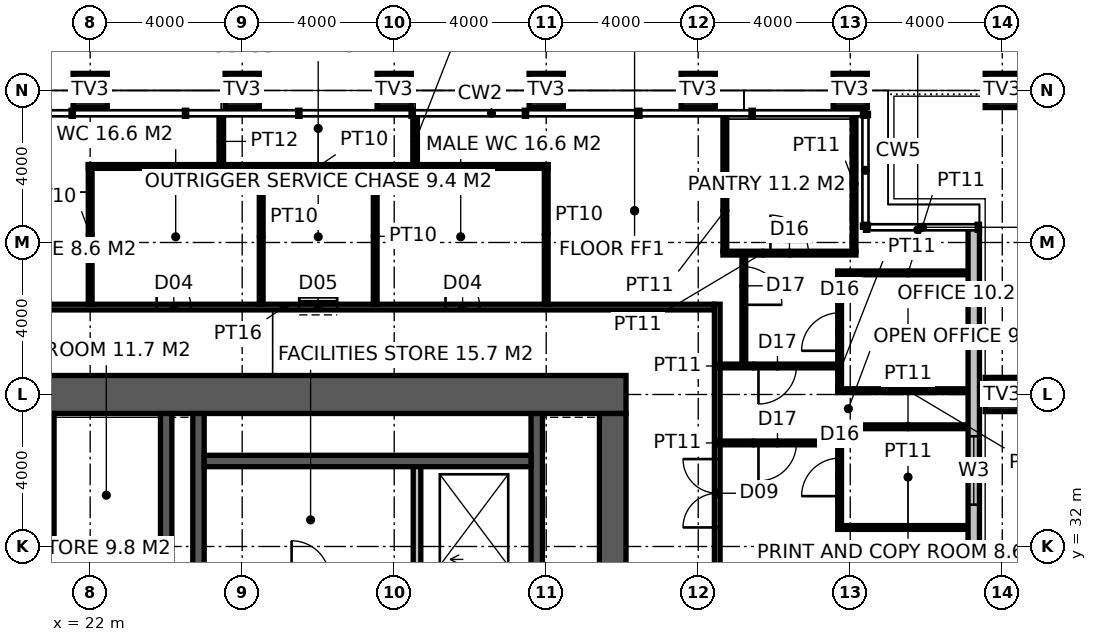
"""IFC4 building model, lengths in metres.
Left out: names, types, materials, properties, quantities, classifications, styles, units other than length and angle.
Written with IfcOpenShell. Run it as: python <this file> out.ifc"""

import sys

from ifc_helpers import new_model, si_unit, direction, frame, frame_2d, origin, origin_2d, place, context, subcontext, project, spatial, rectangle, hollow_rectangle, extrude, element, fill, save


model = new_model("IFC4")
c1 = context("Model", 3, precision=1e-05, world=origin(), true_north=direction((0.0, 1.0)))
c2 = subcontext(c1, "Body", "Model", "MODEL_VIEW")
j1 = project(units=[si_unit("LENGTHUNIT", "METRE"), si_unit("PLANEANGLEUNIT", "RADIAN")], contexts=[c1])
p1 = place(None, origin())
s1 = spatial("IfcSite", under=j1, at=p1, CompositionType="ELEMENT")
p2 = place(p1, origin())
s2 = spatial("IfcBuilding", under=s1, at=p2, CompositionType="ELEMENT")
p3 = place(p2, frame((0.0, 0.0, 270.2)))
s3 = spatial("IfcBuildingStorey", under=s2, at=p3, CompositionType="ELEMENT", Elevation=270.2)
for number, where, z_axis, x_axis in (
    (1, (22.0, 44.0, 0.0), (0.0, 0.0, 1.0), (1.0, 0.0, 0.0)),
    (2, (26.0, 44.0, 0.0), (0.0, 0.0, 1.0), (1.0, 0.0, 0.0)),
    (3, (30.0, 44.0, 0.0), (0.0, 0.0, 1.0), (1.0, 0.0, 0.0)),
    (4, (34.0, 44.0, 0.0), (0.0, 0.0, 1.0), (1.0, 0.0, 0.0)),
    (5, (38.0, 44.0, 0.0), (0.0, 0.0, 1.0), (1.0, 0.0, 0.0)),
    (6, (42.0, 44.0, 0.0), (0.0, 0.0, 1.0), (1.0, 0.0, 0.0)),
    (7, (46.0, 36.0, 0.0), (0.0, 0.0, 1.0), (1.0, 0.0, 0.0)),
    (8, (46.0, 44.0, 0.0), (0.0, 0.0, 1.0), (1.0, 0.0, 0.0)),
):
    element("IfcColumn", number, at=place(p3, frame(where, z_axis=z_axis, x_axis=x_axis)), inside=s3, PredefinedType="USERDEFINED", context=c2, shape_type="SweptSolid", body=[
        extrude(hollow_rectangle(XDim=0.9, YDim=0.9, WallThickness=0.08, at=origin_2d()), origin(), (0.0, 0.0, 1.0), 4.0),
    ])
p4 = place(p3, frame((18.5, 36.0, -0.15), z_axis=(0.0, 0.0, 1.0), x_axis=(1.0, 0.0, 0.0)))
e9 = element("IfcWall", 9, at=p4, inside=s3, PredefinedType="SHEAR", context=c2, shape_type="SweptSolid", body=[
    extrude(rectangle(XDim=17.6, YDim=1.0, at=frame_2d((8.8, 0.0))), origin(), (0.0, 0.0, 1.0), 4.0),
])
p5 = place(p3, frame((35.75, 18.5, -0.15), z_axis=(0.0, 0.0, 1.0), x_axis=(0.0, 1.0, 0.0)))
e10 = element("IfcWall", 10, at=p5, inside=s3, PredefinedType="SHEAR", context=c2, shape_type="SweptSolid", body=[
    extrude(rectangle(XDim=17.0, YDim=0.7, at=frame_2d((8.5, 0.0))), origin(), (0.0, 0.0, 1.0), 4.0),
])
p6 = place(p5, frame((9.85, 0.0, 0.15)))
e11 = element("IfcOpeningElement", 11, at=p6, cuts=e10, PredefinedType="OPENING", context=c2, shape_type="SweptSolid", body=[
    extrude(rectangle(XDim=1.0, YDim=2.2, at=frame_2d((0.5, 1.1))), frame((0.0, 0.36, 0.0), z_axis=(0.0, -1.0, 0.0), x_axis=(1.0, 0.0, 0.0)), (0.0, 0.0, 1.0), 0.72),
])
p7 = place(p3, frame((24.0, 18.5, -0.15), z_axis=(0.0, 0.0, 1.0), x_axis=(0.0, 1.0, 0.0)))
e12 = element("IfcWall", 12, at=p7, inside=s3, PredefinedType="SHEAR", context=c2, shape_type="SweptSolid", body=[
    extrude(rectangle(XDim=17.0, YDim=0.3, at=frame_2d((8.5, 0.0))), origin(), (0.0, 0.0, 1.0), 4.0),
])
p8 = place(p7, frame((9.6, 0.0, 0.15)))
e13 = element("IfcOpeningElement", 13, at=p8, cuts=e12, PredefinedType="OPENING", context=c2, shape_type="SweptSolid", body=[
    extrude(rectangle(XDim=1.5, YDim=2.4, at=frame_2d((0.75, 1.2))), frame((0.0, 0.16, 0.0), z_axis=(0.0, -1.0, 0.0), x_axis=(1.0, 0.0, 0.0)), (0.0, 0.0, 1.0), 0.32),
])
for number, where, z_axis, x_axis in (
    (14, (24.85, 31.3, -0.15), (0.0, 0.0, 1.0), (0.0, 1.0, 0.0)),
    (15, (33.75, 31.3, -0.15), (0.0, 0.0, 1.0), (0.0, 1.0, 0.0)),
):
    element("IfcWall", number, at=place(p3, frame(where, z_axis=z_axis, x_axis=x_axis)), inside=s3, PredefinedType="SHEAR", context=c2, shape_type="SweptSolid", body=[
        extrude(rectangle(XDim=4.2, YDim=0.3, at=frame_2d((2.1, 0.0))), origin(), (0.0, 0.0, 1.0), 4.0),
    ])
p9 = place(p3, frame((25.0, 34.25, -0.15), z_axis=(0.0, 0.0, 1.0), x_axis=(1.0, 0.0, 0.0)))
e16 = element("IfcWall", 16, at=p9, inside=s3, PredefinedType="SHEAR", context=c2, shape_type="SweptSolid", body=[
    extrude(rectangle(XDim=8.6, YDim=0.3, at=frame_2d((4.3, 0.0))), origin(), (0.0, 0.0, 1.0), 4.0),
])
p10 = place(p3, frame((30.6, 31.3, -0.15), z_axis=(0.0, 0.0, 1.0), x_axis=(0.0, 1.0, 0.0)))
e17 = element("IfcWall", 17, at=p10, inside=s3, PredefinedType="SOLIDWALL", context=c2, shape_type="SweptSolid", body=[
    extrude(rectangle(XDim=2.8, YDim=0.2, at=frame_2d((1.4, 0.0))), origin(), (0.0, 0.0, 1.0), 4.0),
])
p11 = place(p3, frame((21.0, 31.3, 0.0), z_axis=(0.0, 0.0, 1.0), x_axis=(0.0, 1.0, 0.0)))
e18 = element("IfcWall", 18, at=p11, inside=s3, PredefinedType="PARTITIONING", context=c2, shape_type="SweptSolid", body=[
    extrude(rectangle(XDim=4.2, YDim=0.1, at=frame_2d((2.1, 0.0))), origin(), (0.0, 0.0, 1.0), 3.85),
])
p12 = place(p11, frame((1.55, 0.0, 0.0)))
e19 = element("IfcOpeningElement", 19, at=p12, cuts=e18, PredefinedType="OPENING", context=c2, shape_type="SweptSolid", body=[
    extrude(rectangle(XDim=1.0, YDim=2.2, at=frame_2d((0.5, 1.1))), frame((0.0, 0.06, 0.0), z_axis=(0.0, -1.0, 0.0), x_axis=(1.0, 0.0, 0.0)), (0.0, 0.0, 1.0), 0.12),
])
p13 = place(p3, frame((38.5, 15.025, 0.0), z_axis=(0.0, 0.0, 1.0), x_axis=(0.0, 1.0, 0.0)))
e20 = element("IfcWall", 20, at=p13, inside=s3, PredefinedType="PARTITIONING", context=c2, shape_type="SweptSolid", body=[
    extrude(rectangle(XDim=23.35, YDim=0.15, at=frame_2d((11.675, 0.0))), origin(), (0.0, 0.0, 1.0), 2.85),
])
p14 = place(p13, frame((3.374, 0.0, 0.0)))
e21 = element("IfcOpeningElement", 21, at=p14, cuts=e20, PredefinedType="OPENING", context=c2, shape_type="SweptSolid", body=[
    extrude(rectangle(XDim=1.8, YDim=2.4, at=frame_2d((0.9, 1.2))), frame((0.0, 0.085, 0.0), z_axis=(0.0, -1.0, 0.0), x_axis=(1.0, 0.0, 0.0)), (0.0, 0.0, 1.0), 0.17),
])
p15 = place(p13, frame((17.476, 0.0, 0.0)))
e22 = element("IfcOpeningElement", 22, at=p15, cuts=e20, PredefinedType="OPENING", context=c2, shape_type="SweptSolid", body=[
    extrude(rectangle(XDim=1.8, YDim=2.4, at=frame_2d((0.9, 1.2))), frame((0.0, 0.085, 0.0), z_axis=(0.0, -1.0, 0.0), x_axis=(1.0, 0.0, 0.0)), (0.0, 0.0, 1.0), 0.17),
])
p16 = place(p13, frame((10.475, 0.0, 0.0)))
e23 = element("IfcOpeningElement", 23, at=p16, cuts=e20, PredefinedType="OPENING", context=c2, shape_type="SweptSolid", body=[
    extrude(rectangle(XDim=1.0, YDim=2.2, at=frame_2d((0.5, 1.1))), frame((0.0, 0.085, 0.0), z_axis=(0.0, -1.0, 0.0), x_axis=(1.0, 0.0, 0.0)), (0.0, 0.0, 1.0), 0.17),
])
p17 = place(p3, frame((15.775, 38.3, 0.0), z_axis=(0.0, 0.0, 1.0), x_axis=(1.0, 0.0, 0.0)))
e24 = element("IfcWall", 24, at=p17, inside=s3, PredefinedType="PARTITIONING", context=c2, shape_type="SweptSolid", body=[
    extrude(rectangle(XDim=22.65, YDim=0.15, at=frame_2d((11.325, 0.0))), origin(), (0.0, 0.0, 1.0), 3.85),
])
p18 = place(p17, frame((7.975, 0.0, 0.0)))
e25 = element("IfcOpeningElement", 25, at=p18, cuts=e24, PredefinedType="OPENING", context=c2, shape_type="SweptSolid", body=[
    extrude(rectangle(XDim=0.9, YDim=2.1, at=frame_2d((0.45, 1.05))), frame((0.0, 0.085, 0.0), z_axis=(0.0, -1.0, 0.0), x_axis=(1.0, 0.0, 0.0)), (0.0, 0.0, 1.0), 0.17),
])
p19 = place(p17, frame((11.725, 0.0, 0.0)))
e26 = element("IfcOpeningElement", 26, at=p19, cuts=e24, PredefinedType="OPENING", context=c2, shape_type="SweptSolid", body=[
    extrude(rectangle(XDim=1.0, YDim=2.1, at=frame_2d((0.5, 1.05))), frame((0.0, 0.085, 0.0), z_axis=(0.0, -1.0, 0.0), x_axis=(1.0, 0.0, 0.0)), (0.0, 0.0, 1.0), 0.17),
])
p20 = place(p17, frame((15.575, 0.0, 0.0)))
e27 = element("IfcOpeningElement", 27, at=p20, cuts=e24, PredefinedType="OPENING", context=c2, shape_type="SweptSolid", body=[
    extrude(rectangle(XDim=0.9, YDim=2.1, at=frame_2d((0.45, 1.05))), frame((0.0, 0.085, 0.0), z_axis=(0.0, -1.0, 0.0), x_axis=(1.0, 0.0, 0.0)), (0.0, 0.0, 1.0), 0.17),
])
for number, where, z_axis, x_axis in (
    (28, (22.0, 38.375, 0.0), (0.0, 0.0, 1.0), (0.0, 1.0, 0.0)),
    (29, (34.0, 38.375, 0.0), (0.0, 0.0, 1.0), (0.0, 1.0, 0.0)),
):
    element("IfcWall", number, at=place(p3, frame(where, z_axis=z_axis, x_axis=x_axis)), inside=s3, PredefinedType="PARTITIONING", context=c2, shape_type="SweptSolid", body=[
        extrude(rectangle(XDim=3.675, YDim=0.1, at=frame_2d((1.837, 0.0))), origin(), (0.0, 0.0, 1.0), 2.85),
    ])
p21 = place(p3, frame((21.95, 42.0, 0.0), z_axis=(0.0, 0.0, 1.0), x_axis=(1.0, 0.0, 0.0)))
e30 = element("IfcWall", 30, at=p21, inside=s3, PredefinedType="PARTITIONING", context=c2, shape_type="SweptSolid", body=[
    extrude(rectangle(XDim=12.1, YDim=0.1, at=frame_2d((6.05, 0.0))), origin(), (0.0, 0.0, 1.0), 3.85),
])
for number, where, z_axis, x_axis in (
    (31, (26.5, 38.375, 0.0), (0.0, 0.0, 1.0), (0.0, 1.0, 0.0)),
    (32, (29.5, 38.375, 0.0), (0.0, 0.0, 1.0), (0.0, 1.0, 0.0)),
):
    element("IfcWall", number, at=place(p3, frame(where, z_axis=z_axis, x_axis=x_axis)), inside=s3, PredefinedType="PARTITIONING", context=c2, shape_type="SweptSolid", body=[
        extrude(rectangle(XDim=3.575, YDim=0.1, at=frame_2d((1.788, 0.0))), origin(), (0.0, 0.0, 1.0), 2.65),
    ])
for number, where, z_axis, x_axis in (
    (33, (25.45, 42.0, 0.0), (0.0, 0.0, 1.0), (0.0, 1.0, 0.0)),
    (34, (30.55, 42.0, 0.0), (0.0, 0.0, 1.0), (0.0, 1.0, 0.0)),
):
    element("IfcWall", number, at=place(p3, frame(where, z_axis=z_axis, x_axis=x_axis)), inside=s3, PredefinedType="PARTITIONING", context=c2, shape_type="SweptSolid", body=[
        extrude(rectangle(XDim=1.32, YDim=0.12, at=frame_2d((0.66, 0.0))), origin(), (0.0, 0.0, 1.0), 2.65),
    ])
p22 = place(p3, frame((41.67, 32.5, 0.0), z_axis=(0.0, 0.0, 1.0), x_axis=(1.0, 0.0, 0.0)))
e35 = element("IfcWall", 35, at=p22, inside=s3, PredefinedType="PARTITIONING", context=c2, shape_type="SweptSolid", body=[
    extrude(rectangle(XDim=3.7, YDim=0.1, at=frame_2d((1.85, 0.0))), origin(), (0.0, 0.0, 1.0), 2.65),
])
p23 = place(p3, frame((41.67, 35.15, 0.0), z_axis=(0.0, 0.0, 1.0), x_axis=(1.0, 0.0, 0.0)))
e36 = element("IfcWall", 36, at=p23, inside=s3, PredefinedType="PARTITIONING", context=c2, shape_type="SweptSolid", body=[
    extrude(rectangle(XDim=3.7, YDim=0.1, at=frame_2d((1.85, 0.0))), origin(), (0.0, 0.0, 1.0), 3.85),
])
p24 = place(p3, frame((41.67, 36.1, 0.0), z_axis=(0.0, 0.0, 1.0), x_axis=(1.0, 0.0, 0.0)))
e37 = element("IfcWall", 37, at=p24, inside=s3, PredefinedType="PARTITIONING", context=c2, shape_type="SweptSolid", body=[
    extrude(rectangle(XDim=3.7, YDim=0.1, at=frame_2d((1.85, 0.0))), origin(), (0.0, 0.0, 1.0), 2.65),
])
p25 = place(p3, frame((41.67, 39.2, 0.0), z_axis=(0.0, 0.0, 1.0), x_axis=(1.0, 0.0, 0.0)))
e38 = element("IfcWall", 38, at=p25, inside=s3, PredefinedType="PARTITIONING", context=c2, shape_type="SweptSolid", body=[
    extrude(rectangle(XDim=3.7, YDim=0.1, at=frame_2d((1.85, 0.0))), origin(), (0.0, 0.0, 1.0), 3.85),
])
p26 = place(p3, frame((38.65, 39.72, 0.0), z_axis=(0.0, 0.0, 1.0), x_axis=(1.0, 0.0, 0.0)))
e39 = element("IfcWall", 39, at=p26, inside=s3, PredefinedType="PARTITIONING", context=c2, shape_type="SweptSolid", body=[
    extrude(rectangle(XDim=3.5, YDim=0.1, at=frame_2d((1.75, 0.0))), origin(), (0.0, 0.0, 1.0), 3.85),
])
p27 = place(p26, frame((1.25, 0.0, 0.0)))
e40 = element("IfcOpeningElement", 40, at=p27, cuts=e39, PredefinedType="OPENING", context=c2, shape_type="SweptSolid", body=[
    extrude(rectangle(XDim=1.0, YDim=2.2, at=frame_2d((0.5, 1.1))), frame((0.0, 0.06, 0.0), z_axis=(0.0, -1.0, 0.0), x_axis=(1.0, 0.0, 0.0)), (0.0, 0.0, 1.0), 0.12),
])
p28 = place(p3, frame((38.7, 39.77, 0.0), z_axis=(0.0, 0.0, 1.0), x_axis=(0.0, 1.0, 0.0)))
e41 = element("IfcWall", 41, at=p28, inside=s3, PredefinedType="PARTITIONING", context=c2, shape_type="SweptSolid", body=[
    extrude(rectangle(XDim=3.55, YDim=0.1, at=frame_2d((1.775, 0.0))), origin(), (0.0, 0.0, 1.0), 3.85),
])
p29 = place(p3, frame((41.72, 32.55, 0.0), z_axis=(0.0, 0.0, 1.0), x_axis=(0.0, 1.0, 0.0)))
e42 = element("IfcWall", 42, at=p29, inside=s3, PredefinedType="PARTITIONING", context=c2, shape_type="SweptSolid", body=[
    extrude(rectangle(XDim=2.55, YDim=0.1, at=frame_2d((1.275, 0.0))), origin(), (0.0, 0.0, 1.0), 3.85),
])
p30 = place(p29, frame((0.775, 0.0, 0.0)))
e43 = element("IfcOpeningElement", 43, at=p30, cuts=e42, PredefinedType="OPENING", context=c2, shape_type="SweptSolid", body=[
    extrude(rectangle(XDim=1.0, YDim=2.2, at=frame_2d((0.5, 1.1))), frame((0.0, 0.06, 0.0), z_axis=(0.0, -1.0, 0.0), x_axis=(1.0, 0.0, 0.0)), (0.0, 0.0, 1.0), 0.12),
])
p31 = place(p3, frame((41.72, 36.15, 0.0), z_axis=(0.0, 0.0, 1.0), x_axis=(0.0, 1.0, 0.0)))
e44 = element("IfcWall", 44, at=p31, inside=s3, PredefinedType="PARTITIONING", context=c2, shape_type="SweptSolid", body=[
    extrude(rectangle(XDim=3.0, YDim=0.1, at=frame_2d((1.5, 0.0))), origin(), (0.0, 0.0, 1.0), 2.85),
])
p32 = place(p31, frame((1.0, 0.0, 0.0)))
e45 = element("IfcOpeningElement", 45, at=p32, cuts=e44, PredefinedType="OPENING", context=c2, shape_type="SweptSolid", body=[
    extrude(rectangle(XDim=1.0, YDim=2.2, at=frame_2d((0.5, 1.1))), frame((0.0, 0.06, 0.0), z_axis=(0.0, -1.0, 0.0), x_axis=(1.0, 0.0, 0.0)), (0.0, 0.0, 1.0), 0.12),
])
p33 = place(p3, frame((42.1, 39.77, 0.0), z_axis=(0.0, 0.0, 1.0), x_axis=(0.0, 1.0, 0.0)))
e46 = element("IfcWall", 46, at=p33, inside=s3, PredefinedType="PARTITIONING", context=c2, shape_type="SweptSolid", body=[
    extrude(rectangle(XDim=3.55, YDim=0.1, at=frame_2d((1.775, 0.0))), origin(), (0.0, 0.0, 1.0), 2.85),
])
p34 = place(p3, frame((41.67, 34.725, 0.0), z_axis=(0.0, 0.0, 1.0), x_axis=(-1.0, 0.0, 0.0)))
e47 = element("IfcWall", 47, at=p34, inside=s3, PredefinedType="PARTITIONING", context=c2, shape_type="SweptSolid", body=[
    extrude(rectangle(XDim=3.17, YDim=0.1, at=frame_2d((1.585, 0.0))), origin(), (0.0, 0.0, 1.0), 3.85),
])
p35 = place(p34, frame((1.085, 0.0, 0.0)))
e48 = element("IfcOpeningElement", 48, at=p35, cuts=e47, PredefinedType="OPENING", context=c2, shape_type="SweptSolid", body=[
    extrude(rectangle(XDim=1.0, YDim=2.2, at=frame_2d((0.5, 1.1))), frame((0.0, 0.06, 0.0), z_axis=(0.0, -1.0, 0.0), x_axis=(1.0, 0.0, 0.0)), (0.0, 0.0, 1.0), 0.12),
])
p36 = place(p3, frame((41.67, 36.75, 0.0), z_axis=(0.0, 0.0, 1.0), x_axis=(-1.0, 0.0, 0.0)))
e49 = element("IfcWall", 49, at=p36, inside=s3, PredefinedType="PARTITIONING", context=c2, shape_type="SweptSolid", body=[
    extrude(rectangle(XDim=3.17, YDim=0.1, at=frame_2d((1.585, 0.0))), origin(), (0.0, 0.0, 1.0), 3.85),
])
p37 = place(p36, frame((1.085, 0.0, 0.0)))
e50 = element("IfcOpeningElement", 50, at=p37, cuts=e49, PredefinedType="OPENING", context=c2, shape_type="SweptSolid", body=[
    extrude(rectangle(XDim=1.0, YDim=2.2, at=frame_2d((0.5, 1.1))), frame((0.0, 0.06, 0.0), z_axis=(0.0, -1.0, 0.0), x_axis=(1.0, 0.0, 0.0)), (0.0, 0.0, 1.0), 0.12),
])
p38 = place(p3, frame((39.2, 39.67, 0.0), z_axis=(0.0, 0.0, 1.0), x_axis=(0.0, -1.0, 0.0)))
e51 = element("IfcWall", 51, at=p38, inside=s3, PredefinedType="PARTITIONING", context=c2, shape_type="SweptSolid", body=[
    extrude(rectangle(XDim=2.92, YDim=0.1, at=frame_2d((1.46, 0.0))), origin(), (0.0, 0.0, 1.0), 3.85),
])
p39 = place(p38, frame((0.31, 0.0, 0.0)))
e52 = element("IfcOpeningElement", 52, at=p39, cuts=e51, PredefinedType="OPENING", context=c2, shape_type="SweptSolid", body=[
    extrude(rectangle(XDim=1.0, YDim=2.2, at=frame_2d((0.5, 1.1))), frame((0.0, 0.06, 0.0), z_axis=(0.0, -1.0, 0.0), x_axis=(1.0, 0.0, 0.0)), (0.0, 0.0, 1.0), 0.12),
])
p40 = place(p3, frame((45.25, 7.6, 0.0), z_axis=(0.0, 0.0, 1.0), x_axis=(0.0, 1.0, 0.0)))
e53 = element("IfcWall", 53, at=p40, inside=s3, PredefinedType="ELEMENTEDWALL", context=c2, shape_type="SweptSolid", body=[
    extrude(rectangle(XDim=32.8, YDim=0.3, at=frame_2d((16.4, 0.0))), origin(), (0.0, 0.0, 1.0), 3.85),
])
p41 = place(p40, frame((5.5, 0.0, 0.8)))
e54 = element("IfcOpeningElement", 54, at=p41, cuts=e53, PredefinedType="OPENING", context=c2, shape_type="SweptSolid", body=[
    extrude(rectangle(XDim=1.8, YDim=2.4, at=frame_2d((0.9, 1.2))), frame((0.0, 0.16, 0.0), z_axis=(0.0, -1.0, 0.0), x_axis=(1.0, 0.0, 0.0)), (0.0, 0.0, 1.0), 0.32),
])
p42 = place(p40, frame((9.5, 0.0, 0.0)))
e55 = element("IfcOpeningElement", 55, at=p42, cuts=e53, PredefinedType="OPENING", context=c2, shape_type="SweptSolid", body=[
    extrude(rectangle(XDim=1.8, YDim=2.4, at=frame_2d((0.9, 1.2))), frame((0.0, 0.16, 0.0), z_axis=(0.0, -1.0, 0.0), x_axis=(1.0, 0.0, 0.0)), (0.0, 0.0, 1.0), 0.32),
])
p43 = place(p40, frame((13.5, 0.0, 0.8)))
e56 = element("IfcOpeningElement", 56, at=p43, cuts=e53, PredefinedType="OPENING", context=c2, shape_type="SweptSolid", body=[
    extrude(rectangle(XDim=1.8, YDim=2.4, at=frame_2d((0.9, 1.2))), frame((0.0, 0.16, 0.0), z_axis=(0.0, -1.0, 0.0), x_axis=(1.0, 0.0, 0.0)), (0.0, 0.0, 1.0), 0.32),
])
p44 = place(p40, frame((17.5, 0.0, 0.8)))
e57 = element("IfcOpeningElement", 57, at=p44, cuts=e53, PredefinedType="OPENING", context=c2, shape_type="SweptSolid", body=[
    extrude(rectangle(XDim=1.8, YDim=2.4, at=frame_2d((0.9, 1.2))), frame((0.0, 0.16, 0.0), z_axis=(0.0, -1.0, 0.0), x_axis=(1.0, 0.0, 0.0)), (0.0, 0.0, 1.0), 0.32),
])
p45 = place(p40, frame((21.5, 0.0, 0.8)))
e58 = element("IfcOpeningElement", 58, at=p45, cuts=e53, PredefinedType="OPENING", context=c2, shape_type="SweptSolid", body=[
    extrude(rectangle(XDim=1.8, YDim=2.4, at=frame_2d((0.9, 1.2))), frame((0.0, 0.16, 0.0), z_axis=(0.0, -1.0, 0.0), x_axis=(1.0, 0.0, 0.0)), (0.0, 0.0, 1.0), 0.32),
])
p46 = place(p40, frame((25.5, 0.0, 0.8)))
e59 = element("IfcOpeningElement", 59, at=p46, cuts=e53, PredefinedType="OPENING", context=c2, shape_type="SweptSolid", body=[
    extrude(rectangle(XDim=1.8, YDim=2.4, at=frame_2d((0.9, 1.2))), frame((0.0, 0.16, 0.0), z_axis=(0.0, -1.0, 0.0), x_axis=(1.0, 0.0, 0.0)), (0.0, 0.0, 1.0), 0.32),
])
p47 = place(p12, origin())
e60 = element("IfcDoor", 60, at=p47, inside=s3, OperationType="SINGLE_SWING_LEFT", PredefinedType="DOOR", context=c2, shape_type="SweptSolid", body=[
    extrude(rectangle(XDim=1.0, YDim=2.2, at=frame_2d((0.5, 1.1))), frame((0.0, 0.025, 0.0), z_axis=(0.0, -1.0, 0.0), x_axis=(1.0, 0.0, 0.0)), (0.0, 0.0, 1.0), 0.05),
])
fill(e19, e60)
p48 = place(p18, origin())
e61 = element("IfcDoor", 61, at=p48, inside=s3, OperationType="SINGLE_SWING_LEFT", PredefinedType="DOOR", context=c2, shape_type="SweptSolid", body=[
    extrude(rectangle(XDim=0.9, YDim=2.1, at=frame_2d((0.45, 1.05))), frame((0.0, 0.025, 0.0), z_axis=(0.0, -1.0, 0.0), x_axis=(1.0, 0.0, 0.0)), (0.0, 0.0, 1.0), 0.05),
])
fill(e25, e61)
p49 = place(p19, origin())
e62 = element("IfcDoor", 62, at=p49, inside=s3, OperationType="SLIDING_TO_LEFT", PredefinedType="DOOR", context=c2, shape_type="SweptSolid", body=[
    extrude(rectangle(XDim=1.0, YDim=2.1, at=frame_2d((0.5, 1.05))), frame((0.0, 0.025, 0.0), z_axis=(0.0, -1.0, 0.0), x_axis=(1.0, 0.0, 0.0)), (0.0, 0.0, 1.0), 0.05),
])
fill(e26, e62)
p50 = place(p20, origin())
e63 = element("IfcDoor", 63, at=p50, inside=s3, OperationType="SINGLE_SWING_LEFT", PredefinedType="DOOR", context=c2, shape_type="SweptSolid", body=[
    extrude(rectangle(XDim=0.9, YDim=2.1, at=frame_2d((0.45, 1.05))), frame((0.0, 0.025, 0.0), z_axis=(0.0, -1.0, 0.0), x_axis=(1.0, 0.0, 0.0)), (0.0, 0.0, 1.0), 0.05),
])
fill(e27, e63)
p51 = place(p15, origin())
e64 = element("IfcDoor", 64, at=p51, inside=s3, OperationType="DOUBLE_DOOR_DOUBLE_SWING", PredefinedType="DOOR", context=c2, shape_type="SweptSolid", body=[
    extrude(rectangle(XDim=1.8, YDim=2.4, at=frame_2d((0.9, 1.2))), frame((0.0, 0.025, 0.0), z_axis=(0.0, -1.0, 0.0), x_axis=(1.0, 0.0, 0.0)), (0.0, 0.0, 1.0), 0.05),
])
fill(e22, e64)
p52 = place(p27, origin())
e65 = element("IfcDoor", 65, at=p52, inside=s3, OperationType="SINGLE_SWING_LEFT", PredefinedType="DOOR", context=c2, shape_type="SweptSolid", body=[
    extrude(rectangle(XDim=1.0, YDim=2.2, at=frame_2d((0.5, 1.1))), frame((0.0, 0.025, 0.0), z_axis=(0.0, -1.0, 0.0), x_axis=(1.0, 0.0, 0.0)), (0.0, 0.0, 1.0), 0.05),
])
fill(e40, e65)
p53 = place(p30, origin())
e66 = element("IfcDoor", 66, at=p53, inside=s3, OperationType="SINGLE_SWING_LEFT", PredefinedType="DOOR", context=c2, shape_type="SweptSolid", body=[
    extrude(rectangle(XDim=1.0, YDim=2.2, at=frame_2d((0.5, 1.1))), frame((0.0, 0.025, 0.0), z_axis=(0.0, -1.0, 0.0), x_axis=(1.0, 0.0, 0.0)), (0.0, 0.0, 1.0), 0.05),
])
fill(e43, e66)
p54 = place(p32, origin())
e67 = element("IfcDoor", 67, at=p54, inside=s3, OperationType="SINGLE_SWING_LEFT", PredefinedType="DOOR", context=c2, shape_type="SweptSolid", body=[
    extrude(rectangle(XDim=1.0, YDim=2.2, at=frame_2d((0.5, 1.1))), frame((0.0, 0.025, 0.0), z_axis=(0.0, -1.0, 0.0), x_axis=(1.0, 0.0, 0.0)), (0.0, 0.0, 1.0), 0.05),
])
fill(e45, e67)
p55 = place(p35, origin())
e68 = element("IfcDoor", 68, at=p55, inside=s3, OperationType="SINGLE_SWING_RIGHT", PredefinedType="DOOR", context=c2, shape_type="SweptSolid", body=[
    extrude(rectangle(XDim=1.0, YDim=2.2, at=frame_2d((0.5, 1.1))), frame((0.0, 0.025, 0.0), z_axis=(0.0, -1.0, 0.0), x_axis=(1.0, 0.0, 0.0)), (0.0, 0.0, 1.0), 0.05),
])
fill(e48, e68)
p56 = place(p37, origin())
e69 = element("IfcDoor", 69, at=p56, inside=s3, OperationType="SINGLE_SWING_RIGHT", PredefinedType="DOOR", context=c2, shape_type="SweptSolid", body=[
    extrude(rectangle(XDim=1.0, YDim=2.2, at=frame_2d((0.5, 1.1))), frame((0.0, 0.025, 0.0), z_axis=(0.0, -1.0, 0.0), x_axis=(1.0, 0.0, 0.0)), (0.0, 0.0, 1.0), 0.05),
])
fill(e50, e69)
p57 = place(p39, origin())
e70 = element("IfcDoor", 70, at=p57, inside=s3, OperationType="SINGLE_SWING_RIGHT", PredefinedType="DOOR", context=c2, shape_type="SweptSolid", body=[
    extrude(rectangle(XDim=1.0, YDim=2.2, at=frame_2d((0.5, 1.1))), frame((0.0, 0.025, 0.0), z_axis=(0.0, -1.0, 0.0), x_axis=(1.0, 0.0, 0.0)), (0.0, 0.0, 1.0), 0.05),
])
fill(e52, e70)
p58 = place(p46, origin())
e71 = element("IfcWindow", 71, at=p58, inside=s3, PartitioningType="SINGLE_PANEL", PredefinedType="WINDOW", context=c2, shape_type="SweptSolid", body=[
    extrude(rectangle(XDim=1.8, YDim=2.4, at=frame_2d((0.9, 1.2))), frame((0.0, 0.03, 0.0), z_axis=(0.0, -1.0, 0.0), x_axis=(1.0, 0.0, 0.0)), (0.0, 0.0, 1.0), 0.06),
])
fill(e59, e71)
save(model, sys.argv[1])
